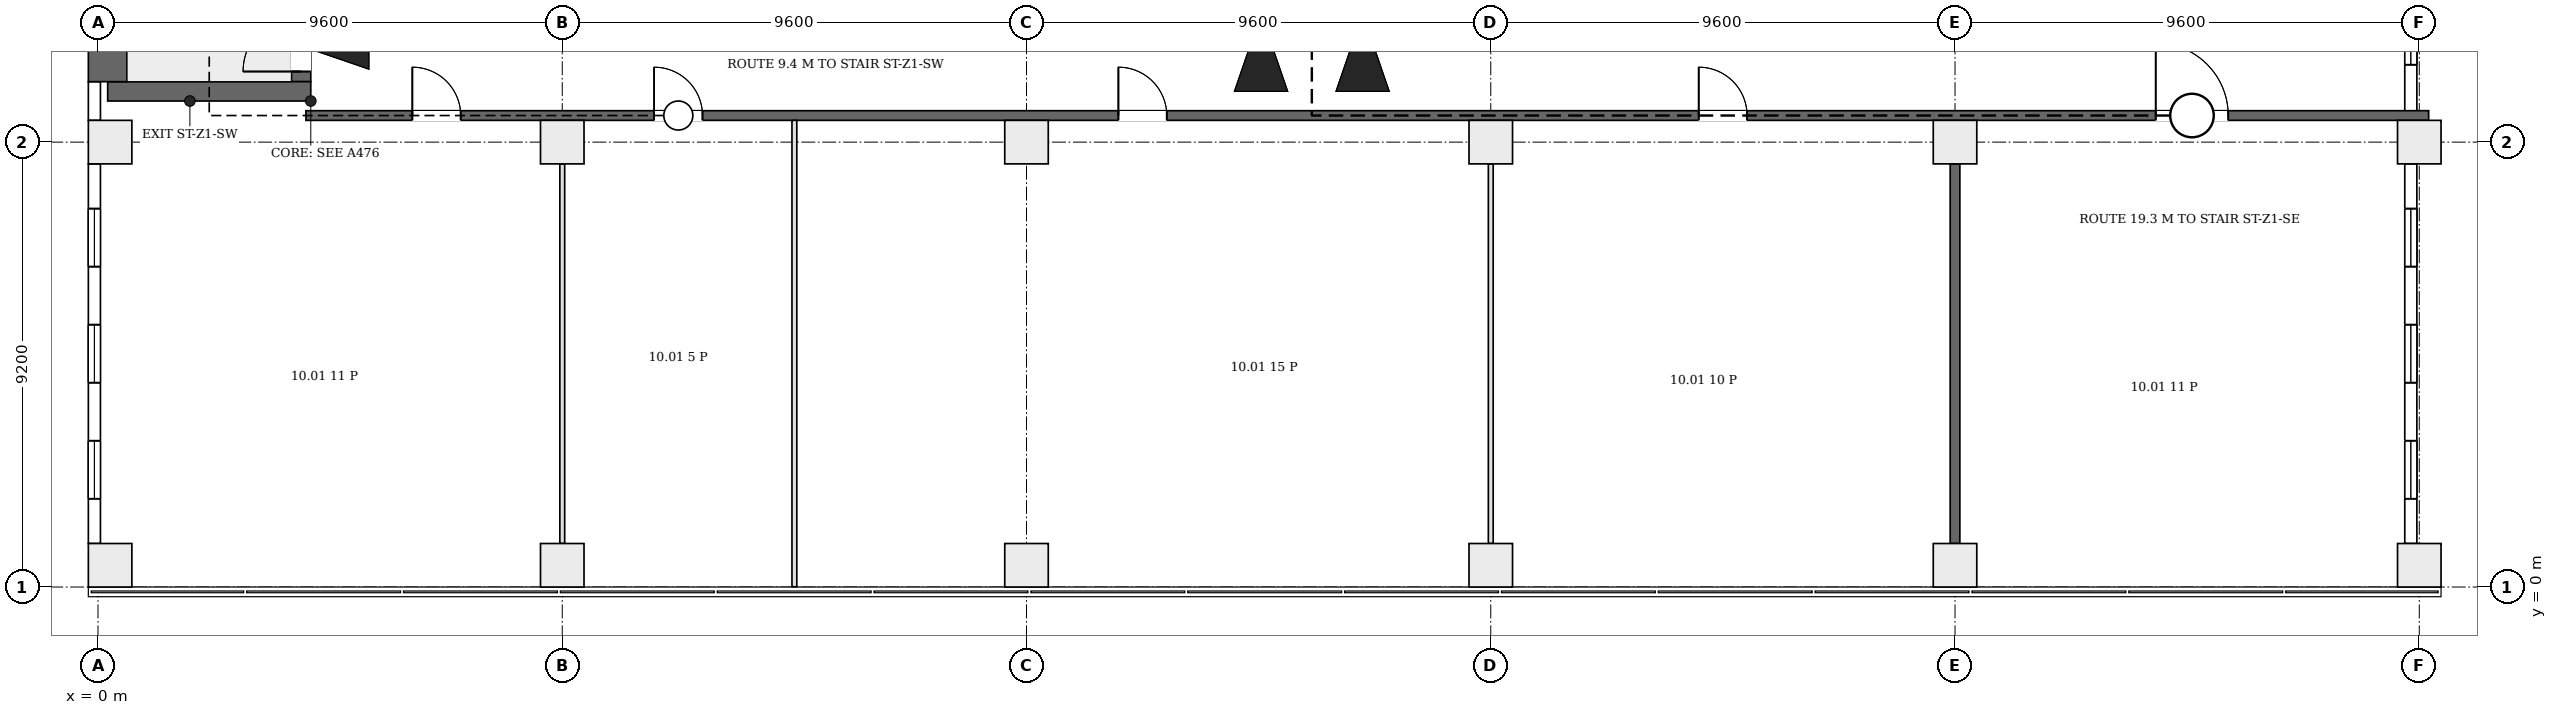
"""IFC4 building model, lengths in metres.
Left out: names, types, materials, properties, quantities, classifications, styles, units other than length and angle.
Written with IfcOpenShell. Run it as: python <this file> out.ifc"""

import sys

from ifc_helpers import new_model, si_unit, direction, frame, frame_2d, origin, origin_2d, place, context, subcontext, project, spatial, rectangle, extrude, element, fill, save


model = new_model("IFC4")
c1 = context("Model", 3, precision=1e-05, world=origin(), true_north=direction((0.0, 1.0)))
c2 = subcontext(c1, "Body", "Model", "MODEL_VIEW")
j1 = project(units=[si_unit("LENGTHUNIT", "METRE"), si_unit("PLANEANGLEUNIT", "RADIAN")], contexts=[c1])
p1 = place(None, origin())
s1 = spatial("IfcSite", under=j1, at=p1, CompositionType="ELEMENT")
p2 = place(p1, origin())
s2 = spatial("IfcBuilding", under=s1, at=p2, CompositionType="ELEMENT")
p3 = place(p2, frame((0.0, 0.0, 52.9)))
s3 = spatial("IfcBuildingStorey", under=s2, at=p3, CompositionType="ELEMENT", Elevation=52.9)
p4 = place(p3, frame((0.2, 10.25, 0.0), z_axis=(0.0, 0.0, 1.0), x_axis=(1.0, 0.0, 0.0)))
e1 = element("IfcWall", 1, at=p4, inside=s3, PredefinedType="SHEAR", context=c2, shape_type="SweptSolid", body=[
    extrude(rectangle(XDim=4.2, YDim=0.4, at=frame_2d((2.1, 0.0))), origin(), (0.0, 0.0, 1.0), 4.2),
])
p5 = place(p3, frame((0.2, 10.45, 0.0), z_axis=(0.0, 0.0, 1.0), x_axis=(0.0, 1.0, 0.0)))
e2 = element("IfcWall", 2, at=p5, inside=s3, PredefinedType="SHEAR", context=c2, shape_type="SweptSolid", body=[
    extrude(rectangle(XDim=6.6, YDim=0.8, at=frame_2d((3.3, 0.0))), origin(), (0.0, 0.0, 1.0), 4.2),
])
p6 = place(p3, frame((4.2, 10.45, 0.0), z_axis=(0.0, 0.0, 1.0), x_axis=(0.0, 1.0, 0.0)))
e3 = element("IfcWall", 3, at=p6, inside=s3, PredefinedType="SHEAR", context=c2, shape_type="SweptSolid", body=[
    extrude(rectangle(XDim=6.6, YDim=0.4, at=frame_2d((3.3, 0.0))), origin(), (0.0, 0.0, 1.0), 4.2),
])
p7 = place(p6, frame((0.21, 0.0, 0.0)))
e4 = element("IfcOpeningElement", 4, at=p7, cuts=e3, PredefinedType="OPENING", context=c2, shape_type="SweptSolid", body=[
    extrude(rectangle(XDim=1.2, YDim=2.1, at=frame_2d((0.6, 1.05))), frame((0.0, 0.21, 0.0), z_axis=(0.0, -1.0, 0.0), x_axis=(1.0, 0.0, 0.0)), (0.0, 0.0, 1.0), 0.42),
])
for number, where, z_axis, x_axis in (
    (5, (0.25, 0.45, 0.0), (0.0, 0.0, 1.0), (1.0, 0.0, 0.0)),
    (6, (9.6, 0.45, 0.0), (0.0, 0.0, 1.0), (1.0, 0.0, 0.0)),
    (7, (19.2, 0.45, 0.0), (0.0, 0.0, 1.0), (1.0, 0.0, 0.0)),
    (8, (28.8, 0.45, 0.0), (0.0, 0.0, 1.0), (1.0, 0.0, 0.0)),
    (9, (38.4, 0.45, 0.0), (0.0, 0.0, 1.0), (1.0, 0.0, 0.0)),
    (10, (48.0, 0.45, 0.0), (0.0, 0.0, 1.0), (1.0, 0.0, 0.0)),
    (11, (0.25, 9.2, 0.0), (0.0, 0.0, 1.0), (1.0, 0.0, 0.0)),
    (12, (9.6, 9.2, 0.0), (0.0, 0.0, 1.0), (1.0, 0.0, 0.0)),
    (13, (19.2, 9.2, 0.0), (0.0, 0.0, 1.0), (1.0, 0.0, 0.0)),
    (14, (28.8, 9.2, 0.0), (0.0, 0.0, 1.0), (1.0, 0.0, 0.0)),
    (15, (38.4, 9.2, 0.0), (0.0, 0.0, 1.0), (1.0, 0.0, 0.0)),
    (16, (48.0, 9.2, 0.0), (0.0, 0.0, 1.0), (1.0, 0.0, 0.0)),
):
    element("IfcColumn", number, at=place(p3, frame(where, z_axis=z_axis, x_axis=x_axis)), inside=s3, PredefinedType="COLUMN", context=c2, shape_type="SweptSolid", body=[
        extrude(rectangle(XDim=0.9, YDim=0.9, at=origin_2d()), origin(), (0.0, 0.0, 1.0), 4.2),
    ])
p8 = place(p3, frame((-0.074, 8.75, 0.0), z_axis=(0.0, 0.0, 1.0), x_axis=(0.0, -1.0, 0.0)))
e17 = element("IfcWall", 17, at=p8, inside=s3, PredefinedType="ELEMENTEDWALL", context=c2, shape_type="SweptSolid", body=[
    extrude(rectangle(XDim=7.85, YDim=0.25, at=frame_2d((3.925, 0.0))), origin(), (0.0, 0.0, 1.0), 3.9),
])
p9 = place(p8, frame((5.725, 0.0, 0.9)))
e18 = element("IfcOpeningElement", 18, at=p9, cuts=e17, PredefinedType="OPENING", context=c2, shape_type="SweptSolid", body=[
    extrude(rectangle(XDim=1.2, YDim=2.6, at=frame_2d((0.6, 1.3))), frame((0.0, 0.135, 0.0), z_axis=(0.0, -1.0, 0.0), x_axis=(1.0, 0.0, 0.0)), (0.0, 0.0, 1.0), 0.27),
])
p10 = place(p8, frame((3.325, 0.0, 0.9)))
e19 = element("IfcOpeningElement", 19, at=p10, cuts=e17, PredefinedType="OPENING", context=c2, shape_type="SweptSolid", body=[
    extrude(rectangle(XDim=1.2, YDim=2.6, at=frame_2d((0.6, 1.3))), frame((0.0, 0.135, 0.0), z_axis=(0.0, -1.0, 0.0), x_axis=(1.0, 0.0, 0.0)), (0.0, 0.0, 1.0), 0.27),
])
p11 = place(p8, frame((0.925, 0.0, 0.9)))
e20 = element("IfcOpeningElement", 20, at=p11, cuts=e17, PredefinedType="OPENING", context=c2, shape_type="SweptSolid", body=[
    extrude(rectangle(XDim=1.2, YDim=2.6, at=frame_2d((0.6, 1.3))), frame((0.0, 0.135, 0.0), z_axis=(0.0, -1.0, 0.0), x_axis=(1.0, 0.0, 0.0)), (0.0, 0.0, 1.0), 0.27),
])
p12 = place(p3, frame((-0.074, 10.45, 0.0), z_axis=(0.0, 0.0, 1.0), x_axis=(0.0, -1.0, 0.0)))
e21 = element("IfcWall", 21, at=p12, inside=s3, PredefinedType="ELEMENTEDWALL", context=c2, shape_type="SweptSolid", body=[
    extrude(rectangle(XDim=0.8, YDim=0.25, at=frame_2d((0.4, 0.0))), origin(), (0.0, 0.0, 1.0), 3.9),
])
p13 = place(p3, frame((47.825, 0.9, 0.0), z_axis=(0.0, 0.0, 1.0), x_axis=(0.0, 1.0, 0.0)))
e22 = element("IfcWall", 22, at=p13, inside=s3, PredefinedType="ELEMENTEDWALL", context=c2, shape_type="SweptSolid", body=[
    extrude(rectangle(XDim=7.85, YDim=0.25, at=frame_2d((3.925, 0.0))), origin(), (0.0, 0.0, 1.0), 3.3),
])
p14 = place(p13, frame((0.925, 0.0, 0.6)))
e23 = element("IfcOpeningElement", 23, at=p14, cuts=e22, PredefinedType="OPENING", context=c2, shape_type="SweptSolid", body=[
    extrude(rectangle(XDim=1.2, YDim=2.6, at=frame_2d((0.6, 1.3))), frame((0.0, 0.135, 0.0), z_axis=(0.0, -1.0, 0.0), x_axis=(1.0, 0.0, 0.0)), (0.0, 0.0, 1.0), 0.27),
])
p15 = place(p13, frame((3.325, 0.0, 0.6)))
e24 = element("IfcOpeningElement", 24, at=p15, cuts=e22, PredefinedType="OPENING", context=c2, shape_type="SweptSolid", body=[
    extrude(rectangle(XDim=1.2, YDim=2.6, at=frame_2d((0.6, 1.3))), frame((0.0, 0.135, 0.0), z_axis=(0.0, -1.0, 0.0), x_axis=(1.0, 0.0, 0.0)), (0.0, 0.0, 1.0), 0.27),
])
p16 = place(p13, frame((5.725, 0.0, 0.6)))
e25 = element("IfcOpeningElement", 25, at=p16, cuts=e22, PredefinedType="OPENING", context=c2, shape_type="SweptSolid", body=[
    extrude(rectangle(XDim=1.2, YDim=2.6, at=frame_2d((0.6, 1.3))), frame((0.0, 0.135, 0.0), z_axis=(0.0, -1.0, 0.0), x_axis=(1.0, 0.0, 0.0)), (0.0, 0.0, 1.0), 0.27),
])
p17 = place(p3, frame((47.825, 9.65, 0.0), z_axis=(0.0, 0.0, 1.0), x_axis=(0.0, 1.0, 0.0)))
e26 = element("IfcWall", 26, at=p17, inside=s3, PredefinedType="ELEMENTEDWALL", context=c2, shape_type="SweptSolid", body=[
    extrude(rectangle(XDim=8.3, YDim=0.25, at=frame_2d((4.15, 0.0))), origin(), (0.0, 0.0, 1.0), 3.3),
])
p18 = place(p17, frame((1.15, 0.0, 0.6)))
e27 = element("IfcOpeningElement", 27, at=p18, cuts=e26, PredefinedType="OPENING", context=c2, shape_type="SweptSolid", body=[
    extrude(rectangle(XDim=1.2, YDim=2.6, at=frame_2d((0.6, 1.3))), frame((0.0, 0.135, 0.0), z_axis=(0.0, -1.0, 0.0), x_axis=(1.0, 0.0, 0.0)), (0.0, 0.0, 1.0), 0.27),
])
p19 = place(p17, frame((3.55, 0.0, 0.6)))
e28 = element("IfcOpeningElement", 28, at=p19, cuts=e26, PredefinedType="OPENING", context=c2, shape_type="SweptSolid", body=[
    extrude(rectangle(XDim=1.2, YDim=2.6, at=frame_2d((0.6, 1.3))), frame((0.0, 0.135, 0.0), z_axis=(0.0, -1.0, 0.0), x_axis=(1.0, 0.0, 0.0)), (0.0, 0.0, 1.0), 0.27),
])
p20 = place(p17, frame((5.95, 0.0, 0.6)))
e29 = element("IfcOpeningElement", 29, at=p20, cuts=e26, PredefinedType="OPENING", context=c2, shape_type="SweptSolid", body=[
    extrude(rectangle(XDim=1.2, YDim=2.6, at=frame_2d((0.6, 1.3))), frame((0.0, 0.135, 0.0), z_axis=(0.0, -1.0, 0.0), x_axis=(1.0, 0.0, 0.0)), (0.0, 0.0, 1.0), 0.27),
])
p21 = place(p3, frame((4.3, 9.75, 0.0), z_axis=(0.0, 0.0, 1.0), x_axis=(1.0, 0.0, 0.0)))
e30 = element("IfcWall", 30, at=p21, inside=s3, PredefinedType="PARTITIONING", context=c2, shape_type="SweptSolid", body=[
    extrude(rectangle(XDim=43.894, YDim=0.2, at=frame_2d((21.947, 0.0))), origin(), (0.0, 0.0, 1.0), 3.9),
])
p22 = place(p21, frame((2.2, 0.0, 0.0)))
e31 = element("IfcOpeningElement", 31, at=p22, cuts=e30, PredefinedType="OPENING", context=c2, shape_type="SweptSolid", body=[
    extrude(rectangle(XDim=1.0, YDim=2.1, at=frame_2d((0.5, 1.05))), frame((0.0, 0.11, 0.0), z_axis=(0.0, -1.0, 0.0), x_axis=(1.0, 0.0, 0.0)), (0.0, 0.0, 1.0), 0.22),
])
p23 = place(p21, frame((7.2, 0.0, 0.0)))
e32 = element("IfcOpeningElement", 32, at=p23, cuts=e30, PredefinedType="OPENING", context=c2, shape_type="SweptSolid", body=[
    extrude(rectangle(XDim=1.0, YDim=2.1, at=frame_2d((0.5, 1.05))), frame((0.0, 0.11, 0.0), z_axis=(0.0, -1.0, 0.0), x_axis=(1.0, 0.0, 0.0)), (0.0, 0.0, 1.0), 0.22),
])
p24 = place(p21, frame((16.8, 0.0, 0.0)))
e33 = element("IfcOpeningElement", 33, at=p24, cuts=e30, PredefinedType="OPENING", context=c2, shape_type="SweptSolid", body=[
    extrude(rectangle(XDim=1.0, YDim=2.1, at=frame_2d((0.5, 1.05))), frame((0.0, 0.11, 0.0), z_axis=(0.0, -1.0, 0.0), x_axis=(1.0, 0.0, 0.0)), (0.0, 0.0, 1.0), 0.22),
])
p25 = place(p21, frame((28.8, 0.0, 0.0)))
e34 = element("IfcOpeningElement", 34, at=p25, cuts=e30, PredefinedType="OPENING", context=c2, shape_type="SweptSolid", body=[
    extrude(rectangle(XDim=1.0, YDim=2.1, at=frame_2d((0.5, 1.05))), frame((0.0, 0.11, 0.0), z_axis=(0.0, -1.0, 0.0), x_axis=(1.0, 0.0, 0.0)), (0.0, 0.0, 1.0), 0.22),
])
p26 = place(p21, frame((38.25, 0.0, 0.0)))
e35 = element("IfcOpeningElement", 35, at=p26, cuts=e30, PredefinedType="OPENING", context=c2, shape_type="SweptSolid", body=[
    extrude(rectangle(XDim=1.5, YDim=2.1, at=frame_2d((0.75, 1.05))), frame((0.0, 0.11, 0.0), z_axis=(0.0, -1.0, 0.0), x_axis=(1.0, 0.0, 0.0)), (0.0, 0.0, 1.0), 0.22),
])
p27 = place(p3, frame((9.6, 0.9, 0.0), z_axis=(0.0, 0.0, 1.0), x_axis=(0.0, 1.0, 0.0)))
e36 = element("IfcWall", 36, at=p27, inside=s3, PredefinedType="PARTITIONING", context=c2, shape_type="SweptSolid", body=[
    extrude(rectangle(XDim=7.85, YDim=0.1, at=frame_2d((3.925, 0.0))), origin(), (0.0, 0.0, 1.0), 3.9),
])
p28 = place(p3, frame((14.4, 0.006, 0.0), z_axis=(0.0, 0.0, 1.0), x_axis=(0.0, 1.0, 0.0)))
e37 = element("IfcWall", 37, at=p28, inside=s3, PredefinedType="PARTITIONING", context=c2, shape_type="SweptSolid", body=[
    extrude(rectangle(XDim=9.644, YDim=0.1, at=frame_2d((4.822, 0.0))), origin(), (0.0, 0.0, 1.0), 3.9),
])
p29 = place(p3, frame((28.8, 0.9, 0.0), z_axis=(0.0, 0.0, 1.0), x_axis=(0.0, 1.0, 0.0)))
e38 = element("IfcWall", 38, at=p29, inside=s3, PredefinedType="PARTITIONING", context=c2, shape_type="SweptSolid", body=[
    extrude(rectangle(XDim=7.85, YDim=0.1, at=frame_2d((3.925, 0.0))), origin(), (0.0, 0.0, 1.0), 3.9),
])
p30 = place(p3, frame((38.4, 0.9, 0.0), z_axis=(0.0, 0.0, 1.0), x_axis=(0.0, 1.0, 0.0)))
e39 = element("IfcWall", 39, at=p30, inside=s3, PredefinedType="PARTITIONING", context=c2, shape_type="SweptSolid", body=[
    extrude(rectangle(XDim=7.85, YDim=0.2, at=frame_2d((3.925, 0.0))), origin(), (0.0, 0.0, 1.0), 3.9),
])
p31 = place(p9, origin())
e40 = element("IfcWindow", 40, at=p31, inside=s3, PartitioningType="SINGLE_PANEL", PredefinedType="WINDOW", context=c2, shape_type="SweptSolid", body=[
    extrude(rectangle(XDim=1.2, YDim=2.6, at=frame_2d((0.6, 1.3))), frame((0.0, 0.03, 0.0), z_axis=(0.0, -1.0, 0.0), x_axis=(1.0, 0.0, 0.0)), (0.0, 0.0, 1.0), 0.06),
])
fill(e18, e40)
p32 = place(p10, origin())
e41 = element("IfcWindow", 41, at=p32, inside=s3, PartitioningType="SINGLE_PANEL", PredefinedType="WINDOW", context=c2, shape_type="SweptSolid", body=[
    extrude(rectangle(XDim=1.2, YDim=2.6, at=frame_2d((0.6, 1.3))), frame((0.0, 0.03, 0.0), z_axis=(0.0, -1.0, 0.0), x_axis=(1.0, 0.0, 0.0)), (0.0, 0.0, 1.0), 0.06),
])
fill(e19, e41)
p33 = place(p11, origin())
e42 = element("IfcWindow", 42, at=p33, inside=s3, PartitioningType="SINGLE_PANEL", PredefinedType="WINDOW", context=c2, shape_type="SweptSolid", body=[
    extrude(rectangle(XDim=1.2, YDim=2.6, at=frame_2d((0.6, 1.3))), frame((0.0, 0.03, 0.0), z_axis=(0.0, -1.0, 0.0), x_axis=(1.0, 0.0, 0.0)), (0.0, 0.0, 1.0), 0.06),
])
fill(e20, e42)
p34 = place(p14, origin())
e43 = element("IfcWindow", 43, at=p34, inside=s3, PartitioningType="SINGLE_PANEL", PredefinedType="WINDOW", context=c2, shape_type="SweptSolid", body=[
    extrude(rectangle(XDim=1.2, YDim=2.6, at=frame_2d((0.6, 1.3))), frame((0.0, 0.03, 0.0), z_axis=(0.0, -1.0, 0.0), x_axis=(1.0, 0.0, 0.0)), (0.0, 0.0, 1.0), 0.06),
])
fill(e23, e43)
p35 = place(p15, origin())
e44 = element("IfcWindow", 44, at=p35, inside=s3, PartitioningType="SINGLE_PANEL", PredefinedType="WINDOW", context=c2, shape_type="SweptSolid", body=[
    extrude(rectangle(XDim=1.2, YDim=2.6, at=frame_2d((0.6, 1.3))), frame((0.0, 0.03, 0.0), z_axis=(0.0, -1.0, 0.0), x_axis=(1.0, 0.0, 0.0)), (0.0, 0.0, 1.0), 0.06),
])
fill(e24, e44)
p36 = place(p16, origin())
e45 = element("IfcWindow", 45, at=p36, inside=s3, PartitioningType="SINGLE_PANEL", PredefinedType="WINDOW", context=c2, shape_type="SweptSolid", body=[
    extrude(rectangle(XDim=1.2, YDim=2.6, at=frame_2d((0.6, 1.3))), frame((0.0, 0.03, 0.0), z_axis=(0.0, -1.0, 0.0), x_axis=(1.0, 0.0, 0.0)), (0.0, 0.0, 1.0), 0.06),
])
fill(e25, e45)
p37 = place(p18, origin())
e46 = element("IfcWindow", 46, at=p37, inside=s3, PartitioningType="SINGLE_PANEL", PredefinedType="WINDOW", context=c2, shape_type="SweptSolid", body=[
    extrude(rectangle(XDim=1.2, YDim=2.6, at=frame_2d((0.6, 1.3))), frame((0.0, 0.03, 0.0), z_axis=(0.0, -1.0, 0.0), x_axis=(1.0, 0.0, 0.0)), (0.0, 0.0, 1.0), 0.06),
])
fill(e27, e46)
p38 = place(p7, origin())
e47 = element("IfcDoor", 47, at=p38, inside=s3, OperationType="SINGLE_SWING_RIGHT", PredefinedType="DOOR", context=c2, shape_type="SweptSolid", body=[
    extrude(rectangle(XDim=1.2, YDim=2.1, at=frame_2d((0.6, 1.05))), frame((0.0, 0.025, 0.0), z_axis=(0.0, -1.0, 0.0), x_axis=(1.0, 0.0, 0.0)), (0.0, 0.0, 1.0), 0.05),
])
fill(e4, e47)
p39 = place(p22, origin())
e48 = element("IfcDoor", 48, at=p39, inside=s3, OperationType="SINGLE_SWING_RIGHT", PredefinedType="DOOR", context=c2, shape_type="SweptSolid", body=[
    extrude(rectangle(XDim=1.0, YDim=2.1, at=frame_2d((0.5, 1.05))), frame((0.0, 0.025, 0.0), z_axis=(0.0, -1.0, 0.0), x_axis=(1.0, 0.0, 0.0)), (0.0, 0.0, 1.0), 0.05),
])
fill(e31, e48)
p40 = place(p23, origin())
e49 = element("IfcDoor", 49, at=p40, inside=s3, OperationType="SINGLE_SWING_LEFT", PredefinedType="DOOR", context=c2, shape_type="SweptSolid", body=[
    extrude(rectangle(XDim=1.0, YDim=2.1, at=frame_2d((0.5, 1.05))), frame((0.0, 0.025, 0.0), z_axis=(0.0, -1.0, 0.0), x_axis=(1.0, 0.0, 0.0)), (0.0, 0.0, 1.0), 0.05),
])
fill(e32, e49)
p41 = place(p24, origin())
e50 = element("IfcDoor", 50, at=p41, inside=s3, OperationType="SINGLE_SWING_RIGHT", PredefinedType="DOOR", context=c2, shape_type="SweptSolid", body=[
    extrude(rectangle(XDim=1.0, YDim=2.1, at=frame_2d((0.5, 1.05))), frame((0.0, 0.025, 0.0), z_axis=(0.0, -1.0, 0.0), x_axis=(1.0, 0.0, 0.0)), (0.0, 0.0, 1.0), 0.05),
])
fill(e33, e50)
p42 = place(p25, origin())
e51 = element("IfcDoor", 51, at=p42, inside=s3, OperationType="SINGLE_SWING_RIGHT", PredefinedType="DOOR", context=c2, shape_type="SweptSolid", body=[
    extrude(rectangle(XDim=1.0, YDim=2.1, at=frame_2d((0.5, 1.05))), frame((0.0, 0.025, 0.0), z_axis=(0.0, -1.0, 0.0), x_axis=(1.0, 0.0, 0.0)), (0.0, 0.0, 1.0), 0.05),
])
fill(e34, e51)
p43 = place(p26, origin())
e52 = element("IfcDoor", 52, at=p43, inside=s3, OperationType="DOUBLE_DOOR_SINGLE_SWING", PredefinedType="DOOR", context=c2, shape_type="SweptSolid", body=[
    extrude(rectangle(XDim=1.5, YDim=2.1, at=frame_2d((0.75, 1.05))), frame((0.0, 0.025, 0.0), z_axis=(0.0, -1.0, 0.0), x_axis=(1.0, 0.0, 0.0)), (0.0, 0.0, 1.0), 0.05),
])
fill(e35, e52)
save(model, sys.argv[1])
